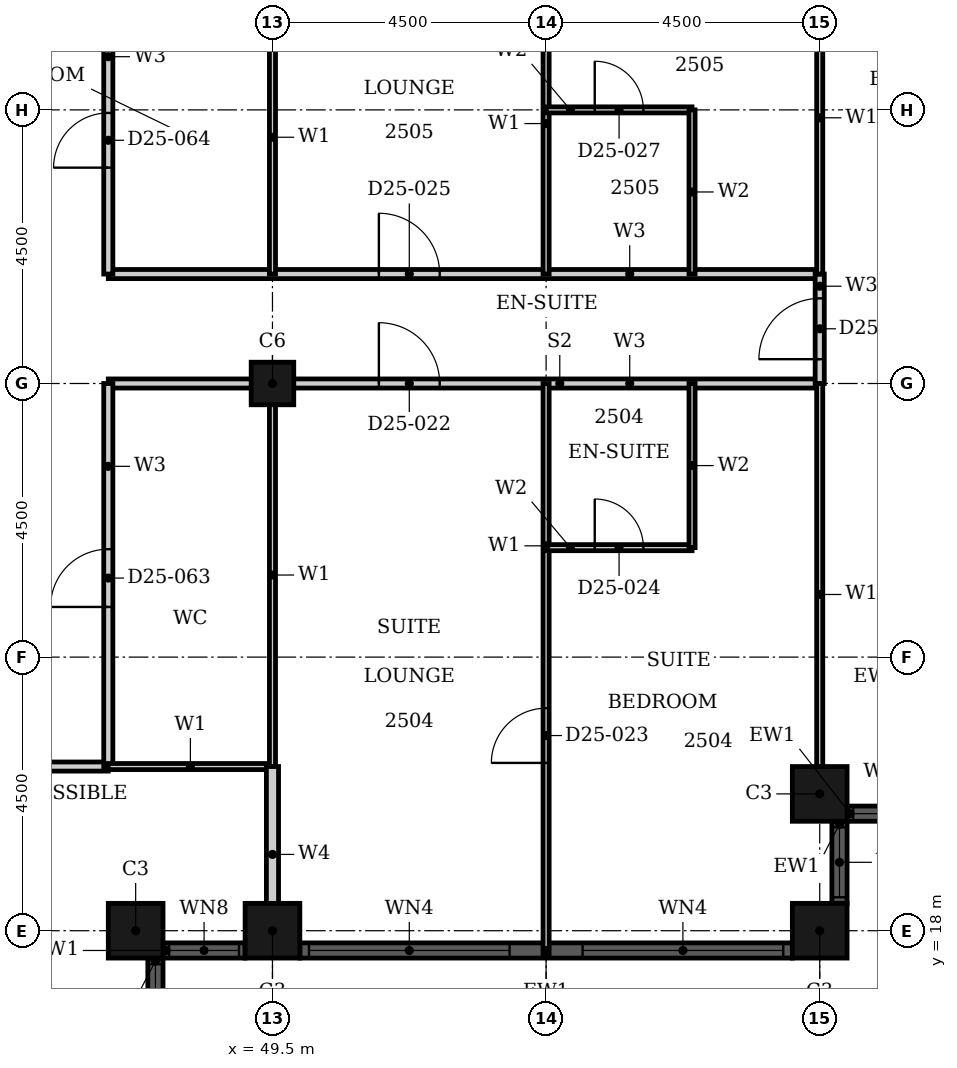
"""IFC4 building model, lengths in metres.
Left out: names, types, materials, properties, quantities, classifications, styles, units other than length and angle.
Written with IfcOpenShell. Run it as: python <this file> out.ifc"""

import sys

from ifc_helpers import new_model, si_unit, direction, frame, frame_2d, origin, origin_2d, place, context, subcontext, project, spatial, rectangle, hollow_rectangle, extrude, element, fill, save


model = new_model("IFC4")
c1 = context("Model", 3, precision=1e-05, world=origin(), true_north=direction((0.0, 1.0)))
c2 = subcontext(c1, "Body", "Model", "MODEL_VIEW")
j1 = project(units=[si_unit("LENGTHUNIT", "METRE"), si_unit("PLANEANGLEUNIT", "RADIAN")], contexts=[c1])
p1 = place(None, origin())
s1 = spatial("IfcSite", under=j1, at=p1, CompositionType="ELEMENT")
p2 = place(p1, origin())
s2 = spatial("IfcBuilding", under=s1, at=p2, CompositionType="ELEMENT")
p3 = place(p2, frame((0.0, 0.0, 104.4)))
s3 = spatial("IfcBuildingStorey", under=s2, at=p3, CompositionType="ELEMENT", Elevation=104.4)
for number, where, z_axis, x_axis in (
    (1, (47.25, 18.0, 0.0), (0.0, 0.0, 1.0), (1.0, 0.0, 0.0)),
    (2, (49.5, 18.0, 0.0), (0.0, 0.0, 1.0), (1.0, 0.0, 0.0)),
    (3, (58.5, 18.0, 0.0), (0.0, 0.0, 1.0), (1.0, 0.0, 0.0)),
    (4, (58.5, 20.25, 0.0), (0.0, 0.0, 1.0), (1.0, 0.0, 0.0)),
):
    element("IfcColumn", number, at=place(p3, frame(where, z_axis=z_axis, x_axis=x_axis)), inside=s3, PredefinedType="COLUMN", context=c2, shape_type="SweptSolid", body=[
        extrude(hollow_rectangle(XDim=0.9, YDim=0.9, WallThickness=0.028, at=origin_2d()), origin(), (0.0, 0.0, 1.0), 3.6),
    ])
p4 = place(p3, frame((49.5, 27.0, 0.0), z_axis=(0.0, 0.0, 1.0), x_axis=(1.0, 0.0, 0.0)))
e5 = element("IfcColumn", 5, at=p4, inside=s3, PredefinedType="COLUMN", context=c2, shape_type="SweptSolid", body=[
    extrude(hollow_rectangle(XDim=0.7, YDim=0.7, WallThickness=0.022, at=origin_2d()), origin(), (0.0, 0.0, 1.0), 3.6),
])
p5 = place(p3, frame((47.575, 16.2, 0.0), z_axis=(0.0, 0.0, 1.0), x_axis=(0.0, 1.0, 0.0)))
e6 = element("IfcWall", 6, at=p5, inside=s3, PredefinedType="SOLIDWALL", context=c2, shape_type="SweptSolid", body=[
    extrude(rectangle(XDim=1.35, YDim=0.25, at=frame_2d((0.675, 0.0))), origin(), (0.0, 0.0, 1.0), 3.6),
])
p6 = place(p5, frame((0.1, 0.0, 0.9)))
e7 = element("IfcOpeningElement", 7, at=p6, cuts=e6, PredefinedType="OPENING", context=c2, shape_type="SweptSolid", body=[
    extrude(rectangle(XDim=1.15, YDim=2.08, at=frame_2d((0.575, 1.04))), frame((0.0, 0.135, 0.0), z_axis=(0.0, -1.0, 0.0), x_axis=(1.0, 0.0, 0.0)), (0.0, 0.0, 1.0), 0.27),
])
p7 = place(p3, frame((47.7, 17.675, 0.0), z_axis=(0.0, 0.0, 1.0), x_axis=(1.0, 0.0, 0.0)))
e8 = element("IfcWall", 8, at=p7, inside=s3, PredefinedType="SOLIDWALL", context=c2, shape_type="SweptSolid", body=[
    extrude(rectangle(XDim=1.35, YDim=0.25, at=frame_2d((0.675, 0.0))), origin(), (0.0, 0.0, 1.0), 3.6),
])
p8 = place(p7, frame((0.1, 0.0, 0.9)))
e9 = element("IfcOpeningElement", 9, at=p8, cuts=e8, PredefinedType="OPENING", context=c2, shape_type="SweptSolid", body=[
    extrude(rectangle(XDim=1.15, YDim=2.08, at=frame_2d((0.575, 1.04))), frame((0.0, 0.135, 0.0), z_axis=(0.0, -1.0, 0.0), x_axis=(1.0, 0.0, 0.0)), (0.0, 0.0, 1.0), 0.27),
])
p9 = place(p3, frame((49.95, 17.675, 0.0), z_axis=(0.0, 0.0, 1.0), x_axis=(1.0, 0.0, 0.0)))
e10 = element("IfcWall", 10, at=p9, inside=s3, PredefinedType="SOLIDWALL", context=c2, shape_type="SweptSolid", body=[
    extrude(rectangle(XDim=8.1, YDim=0.25, at=frame_2d((4.05, 0.0))), origin(), (0.0, 0.0, 1.0), 3.6),
])
p10 = place(p9, frame((0.15, 0.0, 0.9)))
e11 = element("IfcOpeningElement", 11, at=p10, cuts=e10, PredefinedType="OPENING", context=c2, shape_type="SweptSolid", body=[
    extrude(rectangle(XDim=3.3, YDim=2.08, at=frame_2d((1.65, 1.04))), frame((0.0, 0.135, 0.0), z_axis=(0.0, -1.0, 0.0), x_axis=(1.0, 0.0, 0.0)), (0.0, 0.0, 1.0), 0.27),
])
p11 = place(p9, frame((4.65, 0.0, 0.9)))
e12 = element("IfcOpeningElement", 12, at=p11, cuts=e10, PredefinedType="OPENING", context=c2, shape_type="SweptSolid", body=[
    extrude(rectangle(XDim=3.3, YDim=2.08, at=frame_2d((1.65, 1.04))), frame((0.0, 0.135, 0.0), z_axis=(0.0, -1.0, 0.0), x_axis=(1.0, 0.0, 0.0)), (0.0, 0.0, 1.0), 0.27),
])
p12 = place(p3, frame((58.825, 18.45, 0.0), z_axis=(0.0, 0.0, 1.0), x_axis=(0.0, 1.0, 0.0)))
e13 = element("IfcWall", 13, at=p12, inside=s3, PredefinedType="SOLIDWALL", context=c2, shape_type="SweptSolid", body=[
    extrude(rectangle(XDim=1.35, YDim=0.25, at=frame_2d((0.675, 0.0))), origin(), (0.0, 0.0, 1.0), 3.6),
])
p13 = place(p12, frame((0.1, 0.0, 0.9)))
e14 = element("IfcOpeningElement", 14, at=p13, cuts=e13, PredefinedType="OPENING", context=c2, shape_type="SweptSolid", body=[
    extrude(rectangle(XDim=1.15, YDim=2.08, at=frame_2d((0.575, 1.04))), frame((0.0, 0.135, 0.0), z_axis=(0.0, -1.0, 0.0), x_axis=(1.0, 0.0, 0.0)), (0.0, 0.0, 1.0), 0.27),
])
p14 = place(p3, frame((58.95, 19.925, 0.0), z_axis=(0.0, 0.0, 1.0), x_axis=(1.0, 0.0, 0.0)))
e15 = element("IfcWall", 15, at=p14, inside=s3, PredefinedType="SOLIDWALL", context=c2, shape_type="SweptSolid", body=[
    extrude(rectangle(XDim=1.35, YDim=0.25, at=frame_2d((0.675, 0.0))), origin(), (0.0, 0.0, 1.0), 3.6),
])
p15 = place(p14, frame((0.1, 0.0, 0.9)))
e16 = element("IfcOpeningElement", 16, at=p15, cuts=e15, PredefinedType="OPENING", context=c2, shape_type="SweptSolid", body=[
    extrude(rectangle(XDim=1.15, YDim=2.08, at=frame_2d((0.575, 1.04))), frame((0.0, 0.135, 0.0), z_axis=(0.0, -1.0, 0.0), x_axis=(1.0, 0.0, 0.0)), (0.0, 0.0, 1.0), 0.27),
])
p16 = place(p3, frame((40.5, 20.7, 0.0), z_axis=(0.0, 0.0, 1.0), x_axis=(1.0, 0.0, 0.0)))
e17 = element("IfcWall", 17, at=p16, inside=s3, PredefinedType="PARTITIONING", context=c2, shape_type="SweptSolid", body=[
    extrude(rectangle(XDim=6.3, YDim=0.15, at=frame_2d((3.15, 0.0))), origin(), (0.0, 0.0, 1.0), 3.3),
])
p17 = place(p16, frame((2.95, 0.0, 0.0)))
e18 = element("IfcOpeningElement", 18, at=p17, cuts=e17, PredefinedType="OPENING", context=c2, shape_type="SweptSolid", body=[
    extrude(rectangle(XDim=1.0, YDim=2.1, at=frame_2d((0.5, 1.05))), frame((0.0, 0.085, 0.0), z_axis=(0.0, -1.0, 0.0), x_axis=(1.0, 0.0, 0.0)), (0.0, 0.0, 1.0), 0.17),
])
p18 = place(p3, frame((46.8, 27.0, 0.0), z_axis=(0.0, 0.0, 1.0), x_axis=(1.0, 0.0, 0.0)))
e19 = element("IfcWall", 19, at=p18, inside=s3, PredefinedType="PARTITIONING", context=c2, shape_type="SweptSolid", body=[
    extrude(rectangle(XDim=11.7, YDim=0.15, at=frame_2d((5.85, 0.0))), origin(), (0.0, 0.0, 1.0), 2.58),
])
p19 = place(p18, frame((4.45, 0.0, 0.0)))
e20 = element("IfcOpeningElement", 20, at=p19, cuts=e19, PredefinedType="OPENING", context=c2, shape_type="SweptSolid", body=[
    extrude(rectangle(XDim=1.0, YDim=2.1, at=frame_2d((0.5, 1.05))), frame((0.0, 0.085, 0.0), z_axis=(0.0, -1.0, 0.0), x_axis=(1.0, 0.0, 0.0)), (0.0, 0.0, 1.0), 0.17),
])
p20 = place(p3, frame((46.8, 28.8, 0.0), z_axis=(0.0, 0.0, 1.0), x_axis=(1.0, 0.0, 0.0)))
e21 = element("IfcWall", 21, at=p20, inside=s3, PredefinedType="PARTITIONING", context=c2, shape_type="SweptSolid", body=[
    extrude(rectangle(XDim=11.7, YDim=0.15, at=frame_2d((5.85, 0.0))), origin(), (0.0, 0.0, 1.0), 3.3),
])
p21 = place(p20, frame((4.45, 0.0, 0.0)))
e22 = element("IfcOpeningElement", 22, at=p21, cuts=e21, PredefinedType="OPENING", context=c2, shape_type="SweptSolid", body=[
    extrude(rectangle(XDim=1.0, YDim=2.1, at=frame_2d((0.5, 1.05))), frame((0.0, 0.085, 0.0), z_axis=(0.0, -1.0, 0.0), x_axis=(1.0, 0.0, 0.0)), (0.0, 0.0, 1.0), 0.17),
])
p22 = place(p3, frame((46.8, 28.8, 0.0), z_axis=(0.0, 0.0, 1.0), x_axis=(0.0, 1.0, 0.0)))
e23 = element("IfcWall", 23, at=p22, inside=s3, PredefinedType="PARTITIONING", context=c2, shape_type="SweptSolid", body=[
    extrude(rectangle(XDim=4.5, YDim=0.15, at=frame_2d((2.25, 0.0))), origin(), (0.0, 0.0, 1.0), 3.3),
])
p23 = place(p22, frame((1.75, 0.0, 0.0)))
e24 = element("IfcOpeningElement", 24, at=p23, cuts=e23, PredefinedType="OPENING", context=c2, shape_type="SweptSolid", body=[
    extrude(rectangle(XDim=0.9, YDim=2.1, at=frame_2d((0.45, 1.05))), frame((0.0, 0.085, 0.0), z_axis=(0.0, -1.0, 0.0), x_axis=(1.0, 0.0, 0.0)), (0.0, 0.0, 1.0), 0.17),
])
p24 = place(p3, frame((46.8, 20.7, 0.0), z_axis=(0.0, 0.0, 1.0), x_axis=(0.0, 1.0, 0.0)))
e25 = element("IfcWall", 25, at=p24, inside=s3, PredefinedType="PARTITIONING", context=c2, shape_type="SweptSolid", body=[
    extrude(rectangle(XDim=6.3, YDim=0.15, at=frame_2d((3.15, 0.0))), origin(), (0.0, 0.0, 1.0), 3.3),
])
p25 = place(p24, frame((2.625, 0.0, 0.0)))
e26 = element("IfcOpeningElement", 26, at=p25, cuts=e25, PredefinedType="OPENING", context=c2, shape_type="SweptSolid", body=[
    extrude(rectangle(XDim=0.95, YDim=2.1, at=frame_2d((0.475, 1.05))), frame((0.0, 0.085, 0.0), z_axis=(0.0, -1.0, 0.0), x_axis=(1.0, 0.0, 0.0)), (0.0, 0.0, 1.0), 0.17),
])
p26 = place(p3, frame((58.5, 27.0, 0.0), z_axis=(0.0, 0.0, 1.0), x_axis=(0.0, 1.0, 0.0)))
e27 = element("IfcWall", 27, at=p26, inside=s3, PredefinedType="PARTITIONING", context=c2, shape_type="SweptSolid", body=[
    extrude(rectangle(XDim=1.8, YDim=0.15, at=frame_2d((0.9, 0.0))), origin(), (0.0, 0.0, 1.0), 3.3),
])
p27 = place(p26, frame((0.4, 0.0, 0.0)))
e28 = element("IfcOpeningElement", 28, at=p27, cuts=e27, PredefinedType="OPENING", context=c2, shape_type="SweptSolid", body=[
    extrude(rectangle(XDim=1.0, YDim=2.1, at=frame_2d((0.5, 1.05))), frame((0.0, 0.085, 0.0), z_axis=(0.0, -1.0, 0.0), x_axis=(1.0, 0.0, 0.0)), (0.0, 0.0, 1.0), 0.17),
])
p28 = place(p3, frame((46.8, 20.7, 0.0), z_axis=(0.0, 0.0, 1.0), x_axis=(1.0, 0.0, 0.0)))
e29 = element("IfcWall", 29, at=p28, inside=s3, PredefinedType="PARTITIONING", context=c2, shape_type="SweptSolid", body=[
    extrude(rectangle(XDim=2.7, YDim=0.1, at=frame_2d((1.35, 0.0))), origin(), (0.0, 0.0, 1.0), 3.3),
])
p29 = place(p3, frame((49.5, 28.8, 0.0), z_axis=(0.0, 0.0, 1.0), x_axis=(0.0, 1.0, 0.0)))
e30 = element("IfcWall", 30, at=p29, inside=s3, PredefinedType="PARTITIONING", context=c2, shape_type="SweptSolid", body=[
    extrude(rectangle(XDim=4.5, YDim=0.1, at=frame_2d((2.25, 0.0))), origin(), (0.0, 0.0, 1.0), 2.38),
])
p30 = place(p3, frame((49.5, 20.7, 0.0), z_axis=(0.0, 0.0, 1.0), x_axis=(0.0, 1.0, 0.0)))
e31 = element("IfcWall", 31, at=p30, inside=s3, PredefinedType="PARTITIONING", context=c2, shape_type="SweptSolid", body=[
    extrude(rectangle(XDim=6.3, YDim=0.1, at=frame_2d((3.15, 0.0))), origin(), (0.0, 0.0, 1.0), 2.38),
])
p31 = place(p3, frame((54.0, 28.8, 0.0), z_axis=(0.0, 0.0, 1.0), x_axis=(0.0, 1.0, 0.0)))
e32 = element("IfcWall", 32, at=p31, inside=s3, PredefinedType="PARTITIONING", context=c2, shape_type="SweptSolid", body=[
    extrude(rectangle(XDim=7.59, YDim=0.1, at=frame_2d((3.795, 0.0))), origin(), (0.0, 0.0, 1.0), 3.3),
])
p32 = place(p31, frame((4.95, 0.0, 0.0)))
e33 = element("IfcOpeningElement", 33, at=p32, cuts=e32, PredefinedType="OPENING", context=c2, shape_type="SweptSolid", body=[
    extrude(rectangle(XDim=0.9, YDim=2.1, at=frame_2d((0.45, 1.05))), frame((0.0, 0.06, 0.0), z_axis=(0.0, -1.0, 0.0), x_axis=(1.0, 0.0, 0.0)), (0.0, 0.0, 1.0), 0.12),
])
p33 = place(p3, frame((54.0, 17.61, 0.0), z_axis=(0.0, 0.0, 1.0), x_axis=(0.0, 1.0, 0.0)))
e34 = element("IfcWall", 34, at=p33, inside=s3, PredefinedType="PARTITIONING", context=c2, shape_type="SweptSolid", body=[
    extrude(rectangle(XDim=9.39, YDim=0.1, at=frame_2d((4.695, 0.0))), origin(), (0.0, 0.0, 1.0), 3.3),
])
p34 = place(p33, frame((3.15, 0.0, 0.0)))
e35 = element("IfcOpeningElement", 35, at=p34, cuts=e34, PredefinedType="OPENING", context=c2, shape_type="SweptSolid", body=[
    extrude(rectangle(XDim=0.9, YDim=2.1, at=frame_2d((0.45, 1.05))), frame((0.0, 0.06, 0.0), z_axis=(0.0, -1.0, 0.0), x_axis=(1.0, 0.0, 0.0)), (0.0, 0.0, 1.0), 0.12),
])
p35 = place(p3, frame((58.5, 28.8, 0.0), z_axis=(0.0, 0.0, 1.0), x_axis=(0.0, 1.0, 0.0)))
e36 = element("IfcWall", 36, at=p35, inside=s3, PredefinedType="PARTITIONING", context=c2, shape_type="SweptSolid", body=[
    extrude(rectangle(XDim=5.14, YDim=0.1, at=frame_2d((2.57, 0.0))), origin(), (0.0, 0.0, 1.0), 3.3),
])
p36 = place(p3, frame((58.5, 20.06, 0.0), z_axis=(0.0, 0.0, 1.0), x_axis=(0.0, 1.0, 0.0)))
e37 = element("IfcWall", 37, at=p36, inside=s3, PredefinedType="PARTITIONING", context=c2, shape_type="SweptSolid", body=[
    extrude(rectangle(XDim=6.94, YDim=0.1, at=frame_2d((3.47, 0.0))), origin(), (0.0, 0.0, 1.0), 3.3),
])
p37 = place(p3, frame((49.5, 17.81, 0.0), z_axis=(0.0, 0.0, 1.0), x_axis=(0.0, 1.0, 0.0)))
e38 = element("IfcWall", 38, at=p37, inside=s3, PredefinedType="PARTITIONING", context=c2, shape_type="SweptSolid", body=[
    extrude(rectangle(XDim=2.89, YDim=0.2, at=frame_2d((1.445, 0.0))), origin(), (0.0, 0.0, 1.0), 2.38),
])
p38 = place(p3, frame((54.0, 24.3, 0.0), z_axis=(0.0, 0.0, 1.0), x_axis=(1.0, 0.0, 0.0)))
e39 = element("IfcWall", 39, at=p38, inside=s3, PredefinedType="PARTITIONING", context=c2, shape_type="SweptSolid", body=[
    extrude(rectangle(XDim=2.4, YDim=0.1, at=frame_2d((1.2, 0.0))), origin(), (0.0, 0.0, 1.0), 3.3),
])
p39 = place(p38, frame((0.8, 0.0, 0.0)))
e40 = element("IfcOpeningElement", 40, at=p39, cuts=e39, PredefinedType="OPENING", context=c2, shape_type="SweptSolid", body=[
    extrude(rectangle(XDim=0.8, YDim=2.1, at=frame_2d((0.4, 1.05))), frame((0.0, 0.06, 0.0), z_axis=(0.0, -1.0, 0.0), x_axis=(1.0, 0.0, 0.0)), (0.0, 0.0, 1.0), 0.12),
])
p40 = place(p3, frame((54.0, 31.5, 0.0), z_axis=(0.0, 0.0, 1.0), x_axis=(1.0, 0.0, 0.0)))
e41 = element("IfcWall", 41, at=p40, inside=s3, PredefinedType="PARTITIONING", context=c2, shape_type="SweptSolid", body=[
    extrude(rectangle(XDim=2.4, YDim=0.1, at=frame_2d((1.2, 0.0))), origin(), (0.0, 0.0, 1.0), 2.58),
])
p41 = place(p40, frame((0.8, 0.0, 0.0)))
e42 = element("IfcOpeningElement", 42, at=p41, cuts=e41, PredefinedType="OPENING", context=c2, shape_type="SweptSolid", body=[
    extrude(rectangle(XDim=0.8, YDim=2.1, at=frame_2d((0.4, 1.05))), frame((0.0, 0.06, 0.0), z_axis=(0.0, -1.0, 0.0), x_axis=(1.0, 0.0, 0.0)), (0.0, 0.0, 1.0), 0.12),
])
for number, where, z_axis, x_axis in (
    (43, (56.4, 28.8, 0.0), (0.0, 0.0, 1.0), (0.0, 1.0, 0.0)),
    (44, (56.4, 24.3, 0.0), (0.0, 0.0, 1.0), (0.0, 1.0, 0.0)),
):
    element("IfcWall", number, at=place(p3, frame(where, z_axis=z_axis, x_axis=x_axis)), inside=s3, PredefinedType="PARTITIONING", context=c2, shape_type="SweptSolid", body=[
        extrude(rectangle(XDim=2.7, YDim=0.1, at=frame_2d((1.35, 0.0))), origin(), (0.0, 0.0, 1.0), 3.3),
    ])
p42 = place(p6, origin())
e45 = element("IfcWindow", 45, at=p42, inside=s3, PartitioningType="SINGLE_PANEL", PredefinedType="WINDOW", context=c2, shape_type="SweptSolid", body=[
    extrude(rectangle(XDim=1.15, YDim=2.08, at=frame_2d((0.575, 1.04))), frame((0.0, 0.03, 0.0), z_axis=(0.0, -1.0, 0.0), x_axis=(1.0, 0.0, 0.0)), (0.0, 0.0, 1.0), 0.06),
])
fill(e7, e45)
p43 = place(p8, origin())
e46 = element("IfcWindow", 46, at=p43, inside=s3, PartitioningType="SINGLE_PANEL", PredefinedType="WINDOW", context=c2, shape_type="SweptSolid", body=[
    extrude(rectangle(XDim=1.15, YDim=2.08, at=frame_2d((0.575, 1.04))), frame((0.0, 0.03, 0.0), z_axis=(0.0, -1.0, 0.0), x_axis=(1.0, 0.0, 0.0)), (0.0, 0.0, 1.0), 0.06),
])
fill(e9, e46)
p44 = place(p10, origin())
e47 = element("IfcWindow", 47, at=p44, inside=s3, PartitioningType="SINGLE_PANEL", PredefinedType="WINDOW", context=c2, shape_type="SweptSolid", body=[
    extrude(rectangle(XDim=3.3, YDim=2.08, at=frame_2d((1.65, 1.04))), frame((0.0, 0.03, 0.0), z_axis=(0.0, -1.0, 0.0), x_axis=(1.0, 0.0, 0.0)), (0.0, 0.0, 1.0), 0.06),
])
fill(e11, e47)
p45 = place(p11, origin())
e48 = element("IfcWindow", 48, at=p45, inside=s3, PartitioningType="SINGLE_PANEL", PredefinedType="WINDOW", context=c2, shape_type="SweptSolid", body=[
    extrude(rectangle(XDim=3.3, YDim=2.08, at=frame_2d((1.65, 1.04))), frame((0.0, 0.03, 0.0), z_axis=(0.0, -1.0, 0.0), x_axis=(1.0, 0.0, 0.0)), (0.0, 0.0, 1.0), 0.06),
])
fill(e12, e48)
p46 = place(p13, origin())
e49 = element("IfcWindow", 49, at=p46, inside=s3, PartitioningType="SINGLE_PANEL", PredefinedType="WINDOW", context=c2, shape_type="SweptSolid", body=[
    extrude(rectangle(XDim=1.15, YDim=2.08, at=frame_2d((0.575, 1.04))), frame((0.0, 0.03, 0.0), z_axis=(0.0, -1.0, 0.0), x_axis=(1.0, 0.0, 0.0)), (0.0, 0.0, 1.0), 0.06),
])
fill(e14, e49)
p47 = place(p15, origin())
e50 = element("IfcWindow", 50, at=p47, inside=s3, PartitioningType="SINGLE_PANEL", PredefinedType="WINDOW", context=c2, shape_type="SweptSolid", body=[
    extrude(rectangle(XDim=1.15, YDim=2.08, at=frame_2d((0.575, 1.04))), frame((0.0, 0.03, 0.0), z_axis=(0.0, -1.0, 0.0), x_axis=(1.0, 0.0, 0.0)), (0.0, 0.0, 1.0), 0.06),
])
fill(e16, e50)
p48 = place(p19, origin())
e51 = element("IfcDoor", 51, at=p48, inside=s3, OperationType="SINGLE_SWING_RIGHT", PredefinedType="DOOR", context=c2, shape_type="SweptSolid", body=[
    extrude(rectangle(XDim=1.0, YDim=2.1, at=frame_2d((0.5, 1.05))), frame((0.0, 0.025, 0.0), z_axis=(0.0, -1.0, 0.0), x_axis=(1.0, 0.0, 0.0)), (0.0, 0.0, 1.0), 0.05),
])
fill(e20, e51)
p49 = place(p34, origin())
e52 = element("IfcDoor", 52, at=p49, inside=s3, OperationType="SINGLE_SWING_LEFT", PredefinedType="DOOR", context=c2, shape_type="SweptSolid", body=[
    extrude(rectangle(XDim=0.9, YDim=2.1, at=frame_2d((0.45, 1.05))), frame((0.0, 0.025, 0.0), z_axis=(0.0, -1.0, 0.0), x_axis=(1.0, 0.0, 0.0)), (0.0, 0.0, 1.0), 0.05),
])
fill(e35, e52)
p50 = place(p39, origin())
e53 = element("IfcDoor", 53, at=p50, inside=s3, OperationType="SINGLE_SWING_RIGHT", PredefinedType="DOOR", context=c2, shape_type="SweptSolid", body=[
    extrude(rectangle(XDim=0.8, YDim=2.1, at=frame_2d((0.4, 1.05))), frame((0.0, 0.025, 0.0), z_axis=(0.0, -1.0, 0.0), x_axis=(1.0, 0.0, 0.0)), (0.0, 0.0, 1.0), 0.05),
])
fill(e40, e53)
p51 = place(p21, origin())
e54 = element("IfcDoor", 54, at=p51, inside=s3, OperationType="SINGLE_SWING_RIGHT", PredefinedType="DOOR", context=c2, shape_type="SweptSolid", body=[
    extrude(rectangle(XDim=1.0, YDim=2.1, at=frame_2d((0.5, 1.05))), frame((0.0, 0.025, 0.0), z_axis=(0.0, -1.0, 0.0), x_axis=(1.0, 0.0, 0.0)), (0.0, 0.0, 1.0), 0.05),
])
fill(e22, e54)
p52 = place(p41, origin())
e55 = element("IfcDoor", 55, at=p52, inside=s3, OperationType="SINGLE_SWING_RIGHT", PredefinedType="DOOR", context=c2, shape_type="SweptSolid", body=[
    extrude(rectangle(XDim=0.8, YDim=2.1, at=frame_2d((0.4, 1.05))), frame((0.0, 0.025, 0.0), z_axis=(0.0, -1.0, 0.0), x_axis=(1.0, 0.0, 0.0)), (0.0, 0.0, 1.0), 0.05),
])
fill(e42, e55)
p53 = place(p27, origin())
e56 = element("IfcDoor", 56, at=p53, inside=s3, OperationType="SINGLE_SWING_RIGHT", PredefinedType="DOOR", context=c2, shape_type="SweptSolid", body=[
    extrude(rectangle(XDim=1.0, YDim=2.1, at=frame_2d((0.5, 1.05))), frame((0.0, 0.025, 0.0), z_axis=(0.0, -1.0, 0.0), x_axis=(1.0, 0.0, 0.0)), (0.0, 0.0, 1.0), 0.05),
])
fill(e28, e56)
p54 = place(p25, origin())
e57 = element("IfcDoor", 57, at=p54, inside=s3, OperationType="SINGLE_SWING_RIGHT", PredefinedType="DOOR", context=c2, shape_type="SweptSolid", body=[
    extrude(rectangle(XDim=0.95, YDim=2.1, at=frame_2d((0.475, 1.05))), frame((0.0, 0.025, 0.0), z_axis=(0.0, -1.0, 0.0), x_axis=(1.0, 0.0, 0.0)), (0.0, 0.0, 1.0), 0.05),
])
fill(e26, e57)
p55 = place(p23, origin())
e58 = element("IfcDoor", 58, at=p55, inside=s3, OperationType="SINGLE_SWING_RIGHT", PredefinedType="DOOR", context=c2, shape_type="SweptSolid", body=[
    extrude(rectangle(XDim=0.9, YDim=2.1, at=frame_2d((0.45, 1.05))), frame((0.0, 0.025, 0.0), z_axis=(0.0, -1.0, 0.0), x_axis=(1.0, 0.0, 0.0)), (0.0, 0.0, 1.0), 0.05),
])
fill(e24, e58)
save(model, sys.argv[1])
